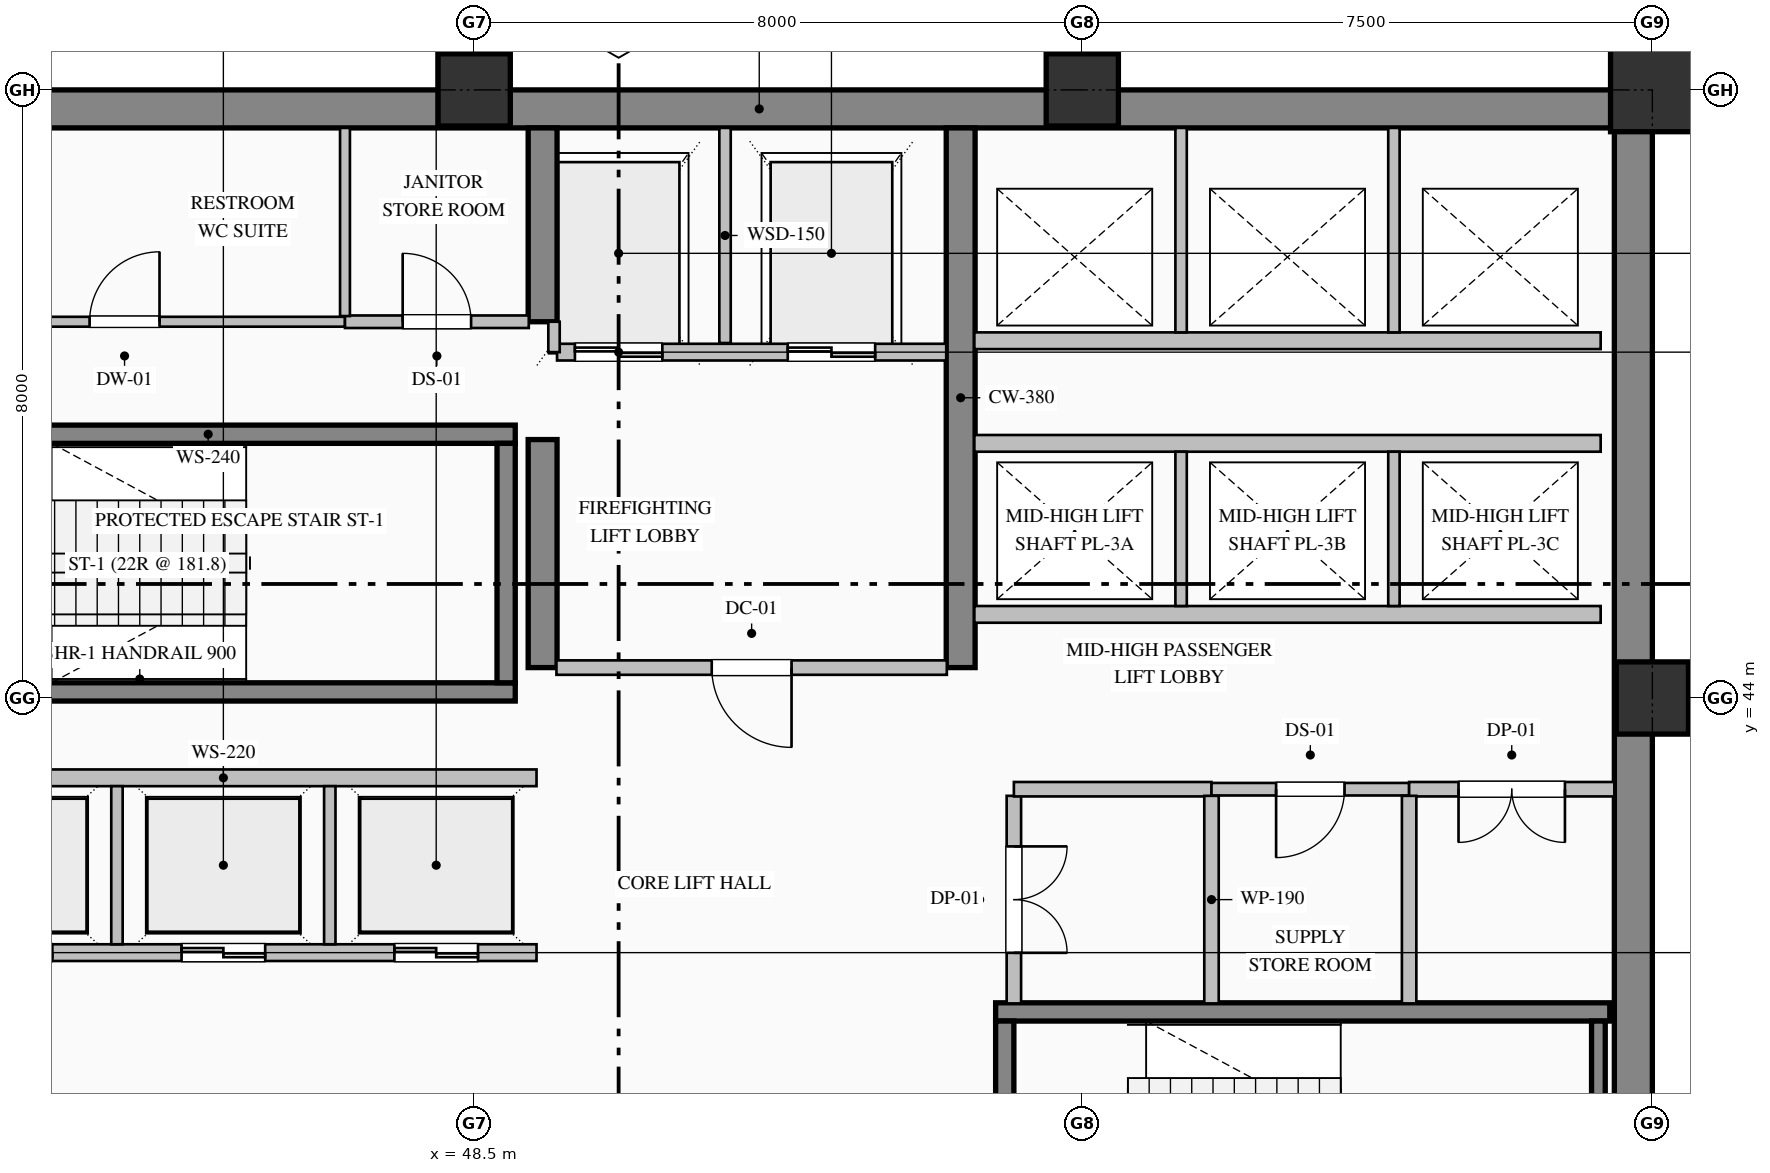
"""IFC4 building model, lengths in metres.
Left out: names, types, materials, properties, quantities, classifications, styles, units other than length and angle.
Written with IfcOpenShell. Run it as: python <this file> out.ifc"""

import sys

from ifc_helpers import new_model, si_unit, direction, frame, frame_2d, origin, origin_2d, place, context, subcontext, project, spatial, rectangle, hollow_rectangle, extrude, element, fill, save


model = new_model("IFC4")
c1 = context("Model", 3, precision=1e-05, world=origin(), true_north=direction((0.0, 1.0)))
c2 = subcontext(c1, "Body", "Model", "MODEL_VIEW")
j1 = project(units=[si_unit("LENGTHUNIT", "METRE"), si_unit("PLANEANGLEUNIT", "RADIAN")], contexts=[c1])
p1 = place(None, origin())
s1 = spatial("IfcSite", under=j1, at=p1, CompositionType="ELEMENT")
p2 = place(p1, origin())
s2 = spatial("IfcBuilding", under=s1, at=p2, CompositionType="ELEMENT")
p3 = place(p2, frame((0.0, 0.0, 127.0)))
s3 = spatial("IfcBuildingStorey", under=s2, at=p3, CompositionType="ELEMENT", Elevation=127.0)
p4 = place(p3, frame((40.5, 51.75, 0.0), z_axis=(0.0, 0.0, 1.0), x_axis=(1.0, 0.0, 0.0)))
e1 = element("IfcWall", 1, at=p4, inside=s3, PredefinedType="SHEAR", context=c2, shape_type="SweptSolid", body=[
    extrude(rectangle(XDim=23.5, YDim=0.5, at=frame_2d((11.75, 0.0))), origin(), (0.0, 0.0, 1.0), 3.765),
])
p5 = place(p3, frame((63.75, 36.32, 0.0), z_axis=(0.0, 0.0, 1.0), x_axis=(0.0, 1.0, 0.0)))
e2 = element("IfcWall", 2, at=p5, inside=s3, PredefinedType="SHEAR", context=c2, shape_type="SweptSolid", body=[
    extrude(rectangle(XDim=15.18, YDim=0.5, at=frame_2d((7.59, 0.0))), origin(), (0.0, 0.0, 1.0), 3.765),
])
p6 = place(p3, frame((49.4, 44.4, 0.0), z_axis=(0.0, 0.0, 1.0), x_axis=(0.0, 1.0, 0.0)))
e3 = element("IfcWall", 3, at=p6, inside=s3, PredefinedType="SHEAR", context=c2, shape_type="SweptSolid", body=[
    extrude(rectangle(XDim=3.0, YDim=0.38, at=frame_2d((1.5, 0.0))), origin(), (0.0, 0.0, 1.0), 3.765),
])
p7 = place(p3, frame((49.4, 48.95, 0.0), z_axis=(0.0, 0.0, 1.0), x_axis=(0.0, 1.0, 0.0)))
e4 = element("IfcWall", 4, at=p7, inside=s3, PredefinedType="SHEAR", context=c2, shape_type="SweptSolid", body=[
    extrude(rectangle(XDim=2.55, YDim=0.38, at=frame_2d((1.275, 0.0))), origin(), (0.0, 0.0, 1.0), 3.765),
])
p8 = place(p3, frame((54.9, 44.4, 0.0), z_axis=(0.0, 0.0, 1.0), x_axis=(0.0, 1.0, 0.0)))
e5 = element("IfcWall", 5, at=p8, inside=s3, PredefinedType="SHEAR", context=c2, shape_type="SweptSolid", body=[
    extrude(rectangle(XDim=7.1, YDim=0.38, at=frame_2d((3.55, 0.0))), origin(), (0.0, 0.0, 1.0), 3.765),
])
for number, where, z_axis, x_axis in (
    (6, (48.5, 52.0, 0.0), (0.0, 0.0, 1.0), (1.0, 0.0, 0.0)),
    (7, (56.5, 52.0, 0.0), (0.0, 0.0, 1.0), (1.0, 0.0, 0.0)),
    (8, (64.0, 44.0, 0.0), (0.0, 0.0, 1.0), (1.0, 0.0, 0.0)),
):
    element("IfcColumn", number, at=place(p3, frame(where, z_axis=z_axis, x_axis=x_axis)), inside=s3, PredefinedType="COLUMN", context=c2, shape_type="SweptSolid", body=[
        extrude(hollow_rectangle(XDim=0.95, YDim=0.95, WallThickness=0.036, at=origin_2d()), origin(), (0.0, 0.0, 1.0), 4.0),
    ])
p9 = place(p3, frame((64.0, 52.0, 0.0), z_axis=(0.0, 0.0, 1.0), x_axis=(1.0, 0.0, 0.0)))
e9 = element("IfcColumn", 9, at=p9, inside=s3, PredefinedType="COLUMN", context=c2, shape_type="SweptSolid", body=[
    extrude(hollow_rectangle(XDim=1.1, YDim=1.1, WallThickness=0.04, at=origin_2d()), origin(), (0.0, 0.0, 1.0), 4.0),
])
for number, where, z_axis, x_axis in (
    (10, (40.96, 47.47, 0.0), (0.0, 0.0, 1.0), (1.0, 0.0, 0.0)),
    (11, (49.04, 44.08, 0.0), (0.0, 0.0, 1.0), (-1.0, 0.0, 0.0)),
):
    element("IfcWall", number, at=place(p3, frame(where, z_axis=z_axis, x_axis=x_axis)), inside=s3, PredefinedType="SOLIDWALL", context=c2, shape_type="SweptSolid", body=[
        extrude(rectangle(XDim=8.08, YDim=0.24, at=frame_2d((4.04, 0.0))), origin(), (0.0, 0.0, 1.0), 4.0),
    ])
p10 = place(p3, frame((48.92, 44.2, 0.0), z_axis=(0.0, 0.0, 1.0), x_axis=(0.0, 1.0, 0.0)))
e12 = element("IfcWall", 12, at=p10, inside=s3, PredefinedType="SOLIDWALL", context=c2, shape_type="SweptSolid", body=[
    extrude(rectangle(XDim=3.15, YDim=0.24, at=frame_2d((1.575, 0.0))), origin(), (0.0, 0.0, 1.0), 4.0),
])
p11 = place(p3, frame((55.36, 39.87, 0.0), z_axis=(0.0, 0.0, 1.0), x_axis=(1.0, 0.0, 0.0)))
e13 = element("IfcWall", 13, at=p11, inside=s3, PredefinedType="SOLIDWALL", context=c2, shape_type="SweptSolid", body=[
    extrude(rectangle(XDim=8.08, YDim=0.24, at=frame_2d((4.04, 0.0))), origin(), (0.0, 0.0, 1.0), 4.0),
])
p12 = place(p3, frame((55.48, 39.75, 0.0), z_axis=(0.0, 0.0, 1.0), x_axis=(0.0, -1.0, 0.0)))
e14 = element("IfcWall", 14, at=p12, inside=s3, PredefinedType="SOLIDWALL", context=c2, shape_type="SweptSolid", body=[
    extrude(rectangle(XDim=3.15, YDim=0.24, at=frame_2d((1.575, 0.0))), origin(), (0.0, 0.0, 1.0), 4.0),
])
p13 = place(p12, frame((1.0, 0.0, 0.0)))
e15 = element("IfcOpeningElement", 15, at=p13, cuts=e14, PredefinedType="OPENING", context=c2, shape_type="SweptSolid", body=[
    extrude(rectangle(XDim=1.15, YDim=2.2, at=frame_2d((0.575, 1.1))), frame((0.0, 0.13, 0.0), z_axis=(0.0, -1.0, 0.0), x_axis=(1.0, 0.0, 0.0)), (0.0, 0.0, 1.0), 0.26),
])
p14 = place(p3, frame((63.29, 36.6, 0.0), z_axis=(0.0, 0.0, 1.0), x_axis=(0.0, 1.0, 0.0)))
e16 = element("IfcWall", 16, at=p14, inside=s3, PredefinedType="SOLIDWALL", context=c2, shape_type="SweptSolid", body=[
    extrude(rectangle(XDim=3.15, YDim=0.18, at=frame_2d((1.575, 0.0))), origin(), (0.0, 0.0, 1.0), 4.0),
])
p15 = place(p3, frame((54.71, 48.55, 0.0), z_axis=(0.0, 0.0, 1.0), x_axis=(-1.0, 0.0, 0.0)))
e17 = element("IfcWall", 17, at=p15, inside=s3, PredefinedType="PARTITIONING", context=c2, shape_type="SweptSolid", body=[
    extrude(rectangle(XDim=5.12, YDim=0.22, at=frame_2d((2.56, 0.0))), origin(), (0.0, 0.0, 1.0), 3.765),
])
p16 = place(p15, frame((3.735, 0.0, 0.0)))
e18 = element("IfcOpeningElement", 18, at=p16, cuts=e17, PredefinedType="OPENING", context=c2, shape_type="SweptSolid", body=[
    extrude(rectangle(XDim=1.15, YDim=2.2, at=frame_2d((0.575, 1.1))), frame((0.0, 0.12, 0.0), z_axis=(0.0, -1.0, 0.0), x_axis=(1.0, 0.0, 0.0)), (0.0, 0.0, 1.0), 0.24),
])
p17 = place(p15, frame((0.935, 0.0, 0.0)))
e19 = element("IfcOpeningElement", 19, at=p17, cuts=e17, PredefinedType="OPENING", context=c2, shape_type="SweptSolid", body=[
    extrude(rectangle(XDim=1.15, YDim=2.2, at=frame_2d((0.575, 1.1))), frame((0.0, 0.12, 0.0), z_axis=(0.0, -1.0, 0.0), x_axis=(1.0, 0.0, 0.0)), (0.0, 0.0, 1.0), 0.24),
])
p18 = place(p3, frame((51.8, 48.67, 0.0), z_axis=(0.0, 0.0, 1.0), x_axis=(0.0, 1.0, 0.0)))
e20 = element("IfcWall", 20, at=p18, inside=s3, PredefinedType="PARTITIONING", context=c2, shape_type="SweptSolid", body=[
    extrude(rectangle(XDim=2.83, YDim=0.15, at=frame_2d((1.415, 0.0))), origin(), (0.0, 0.0, 1.0), 3.765),
])
p19 = place(p3, frame((49.55, 48.55, 0.0), z_axis=(0.0, 0.0, 1.0), x_axis=(0.0, 1.0, 0.0)))
e21 = element("IfcWall", 21, at=p19, inside=s3, PredefinedType="PARTITIONING", context=c2, shape_type="SweptSolid", body=[
    extrude(rectangle(XDim=0.4, YDim=0.15, at=frame_2d((0.2, 0.0))), origin(), (0.0, 0.0, 1.0), 3.765),
])
p20 = place(p3, frame((49.32, 40.65, 0.0), z_axis=(0.0, 0.0, 1.0), x_axis=(-1.0, 0.0, 0.0)))
e22 = element("IfcWall", 22, at=p20, inside=s3, PredefinedType="PARTITIONING", context=c2, shape_type="SweptSolid", body=[
    extrude(rectangle(XDim=8.24, YDim=0.22, at=frame_2d((4.12, 0.0))), origin(), (0.0, 0.0, 1.0), 3.765),
])
p21 = place(p20, frame((6.37, 0.0, 0.0)))
e23 = element("IfcOpeningElement", 23, at=p21, cuts=e22, PredefinedType="OPENING", context=c2, shape_type="SweptSolid", body=[
    extrude(rectangle(XDim=1.1, YDim=2.2, at=frame_2d((0.55, 1.1))), frame((0.0, 0.12, 0.0), z_axis=(0.0, -1.0, 0.0), x_axis=(1.0, 0.0, 0.0)), (0.0, 0.0, 1.0), 0.24),
])
p22 = place(p20, frame((3.57, 0.0, 0.0)))
e24 = element("IfcOpeningElement", 24, at=p22, cuts=e22, PredefinedType="OPENING", context=c2, shape_type="SweptSolid", body=[
    extrude(rectangle(XDim=1.1, YDim=2.2, at=frame_2d((0.55, 1.1))), frame((0.0, 0.12, 0.0), z_axis=(0.0, -1.0, 0.0), x_axis=(1.0, 0.0, 0.0)), (0.0, 0.0, 1.0), 0.24),
])
p23 = place(p20, frame((0.77, 0.0, 0.0)))
e25 = element("IfcOpeningElement", 25, at=p23, cuts=e22, PredefinedType="OPENING", context=c2, shape_type="SweptSolid", body=[
    extrude(rectangle(XDim=1.1, YDim=2.2, at=frame_2d((0.55, 1.1))), frame((0.0, 0.12, 0.0), z_axis=(0.0, -1.0, 0.0), x_axis=(1.0, 0.0, 0.0)), (0.0, 0.0, 1.0), 0.24),
])
p24 = place(p3, frame((41.08, 42.95, 0.0), z_axis=(0.0, 0.0, 1.0), x_axis=(1.0, 0.0, 0.0)))
e26 = element("IfcWall", 26, at=p24, inside=s3, PredefinedType="PARTITIONING", context=c2, shape_type="SweptSolid", body=[
    extrude(rectangle(XDim=8.24, YDim=0.22, at=frame_2d((4.12, 0.0))), origin(), (0.0, 0.0, 1.0), 3.765),
])
for number, where, z_axis, x_axis in (
    (27, (43.8, 40.76, 0.0), (0.0, 0.0, 1.0), (0.0, 1.0, 0.0)),
    (28, (46.6, 40.76, 0.0), (0.0, 0.0, 1.0), (0.0, 1.0, 0.0)),
):
    element("IfcWall", number, at=place(p3, frame(where, z_axis=z_axis, x_axis=x_axis)), inside=s3, PredefinedType="PARTITIONING", context=c2, shape_type="SweptSolid", body=[
        extrude(rectangle(XDim=2.08, YDim=0.15, at=frame_2d((1.04, 0.0))), origin(), (0.0, 0.0, 1.0), 3.765),
    ])
for number, where, z_axis, x_axis in (
    (29, (63.32, 45.1, 0.0), (0.0, 0.0, 1.0), (-1.0, 0.0, 0.0)),
    (30, (55.08, 47.35, 0.0), (0.0, 0.0, 1.0), (1.0, 0.0, 0.0)),
):
    element("IfcWall", number, at=place(p3, frame(where, z_axis=z_axis, x_axis=x_axis)), inside=s3, PredefinedType="PARTITIONING", context=c2, shape_type="SweptSolid", body=[
        extrude(rectangle(XDim=8.24, YDim=0.22, at=frame_2d((4.12, 0.0))), origin(), (0.0, 0.0, 1.0), 3.765),
    ])
for number, where, z_axis, x_axis in (
    (31, (57.8, 45.21, 0.0), (0.0, 0.0, 1.0), (0.0, 1.0, 0.0)),
    (32, (60.6, 45.21, 0.0), (0.0, 0.0, 1.0), (0.0, 1.0, 0.0)),
):
    element("IfcWall", number, at=place(p3, frame(where, z_axis=z_axis, x_axis=x_axis)), inside=s3, PredefinedType="PARTITIONING", context=c2, shape_type="SweptSolid", body=[
        extrude(rectangle(XDim=2.03, YDim=0.15, at=frame_2d((1.015, 0.0))), origin(), (0.0, 0.0, 1.0), 3.765),
    ])
p25 = place(p3, frame((63.32, 48.7, 0.0), z_axis=(0.0, 0.0, 1.0), x_axis=(-1.0, 0.0, 0.0)))
e33 = element("IfcWall", 33, at=p25, inside=s3, PredefinedType="PARTITIONING", context=c2, shape_type="SweptSolid", body=[
    extrude(rectangle(XDim=8.24, YDim=0.22, at=frame_2d((4.12, 0.0))), origin(), (0.0, 0.0, 1.0), 3.765),
])
for number, where, z_axis, x_axis in (
    (34, (57.8, 48.81, 0.0), (0.0, 0.0, 1.0), (0.0, 1.0, 0.0)),
    (35, (60.6, 48.81, 0.0), (0.0, 0.0, 1.0), (0.0, 1.0, 0.0)),
):
    element("IfcWall", number, at=place(p3, frame(where, z_axis=z_axis, x_axis=x_axis)), inside=s3, PredefinedType="PARTITIONING", context=c2, shape_type="SweptSolid", body=[
        extrude(rectangle(XDim=2.69, YDim=0.15, at=frame_2d((1.345, 0.0))), origin(), (0.0, 0.0, 1.0), 3.765),
    ])
p26 = place(p3, frame((41.0, 48.95, 0.0), z_axis=(0.0, 0.0, 1.0), x_axis=(1.0, 0.0, 0.0)))
e36 = element("IfcWall", 36, at=p26, inside=s3, PredefinedType="PARTITIONING", context=c2, shape_type="SweptSolid", body=[
    extrude(rectangle(XDim=5.8, YDim=0.13, at=frame_2d((2.9, 0.0))), origin(), (0.0, 0.0, 1.0), 3.765),
])
p27 = place(p26, frame((2.44, 0.0, 0.0)))
e37 = element("IfcOpeningElement", 37, at=p27, cuts=e36, PredefinedType="OPENING", context=c2, shape_type="SweptSolid", body=[
    extrude(rectangle(XDim=0.92, YDim=2.15, at=frame_2d((0.46, 1.075))), frame((0.0, 0.075, 0.0), z_axis=(0.0, -1.0, 0.0), x_axis=(1.0, 0.0, 0.0)), (0.0, 0.0, 1.0), 0.15),
])
p28 = place(p3, frame((46.8, 48.95, 0.0), z_axis=(0.0, 0.0, 1.0), x_axis=(1.0, 0.0, 0.0)))
e38 = element("IfcWall", 38, at=p28, inside=s3, PredefinedType="PARTITIONING", context=c2, shape_type="SweptSolid", body=[
    extrude(rectangle(XDim=2.418, YDim=0.165, at=frame_2d((1.209, 0.0))), origin(), (0.0, 0.0, 1.0), 3.765),
])
p29 = place(p28, frame((0.759, 0.0, 0.0)))
e39 = element("IfcOpeningElement", 39, at=p29, cuts=e38, PredefinedType="OPENING", context=c2, shape_type="SweptSolid", body=[
    extrude(rectangle(XDim=0.9, YDim=2.15, at=frame_2d((0.45, 1.075))), frame((0.0, 0.093, 0.0), z_axis=(0.0, -1.0, 0.0), x_axis=(1.0, 0.0, 0.0)), (0.0, 0.0, 1.0), 0.185),
])
p30 = place(p3, frame((54.718, 44.4, 0.0), z_axis=(0.0, 0.0, 1.0), x_axis=(-1.0, 0.0, 0.0)))
e40 = element("IfcWall", 40, at=p30, inside=s3, PredefinedType="PARTITIONING", context=c2, shape_type="SweptSolid", body=[
    extrude(rectangle(XDim=5.136, YDim=0.19, at=frame_2d((2.568, 0.0))), origin(), (0.0, 0.0, 1.0), 3.765),
])
p31 = place(p30, frame((2.043, 0.0, 0.0)))
e41 = element("IfcOpeningElement", 41, at=p31, cuts=e40, PredefinedType="OPENING", context=c2, shape_type="SweptSolid", body=[
    extrude(rectangle(XDim=1.05, YDim=2.15, at=frame_2d((0.525, 1.075))), frame((0.0, 0.105, 0.0), z_axis=(0.0, -1.0, 0.0), x_axis=(1.0, 0.0, 0.0)), (0.0, 0.0, 1.0), 0.21),
])
p32 = place(p3, frame((55.6, 42.713, 0.0), z_axis=(0.0, 0.0, 1.0), x_axis=(0.0, -1.0, 0.0)))
e42 = element("IfcWall", 42, at=p32, inside=s3, PredefinedType="PARTITIONING", context=c2, shape_type="SweptSolid", body=[
    extrude(rectangle(XDim=2.731, YDim=0.19, at=frame_2d((1.365, 0.0))), origin(), (0.0, 0.0, 1.0), 3.765),
])
p33 = place(p32, frame((0.666, 0.0, 0.0)))
e43 = element("IfcOpeningElement", 43, at=p33, cuts=e42, PredefinedType="OPENING", context=c2, shape_type="SweptSolid", body=[
    extrude(rectangle(XDim=1.4, YDim=2.25, at=frame_2d((0.7, 1.125))), frame((0.0, 0.105, 0.0), z_axis=(0.0, -1.0, 0.0), x_axis=(1.0, 0.0, 0.0)), (0.0, 0.0, 1.0), 0.21),
])
p34 = place(p3, frame((58.2, 42.8, 0.0), z_axis=(0.0, 0.0, 1.0), x_axis=(-1.0, 0.0, 0.0)))
e44 = element("IfcWall", 44, at=p34, inside=s3, PredefinedType="PARTITIONING", context=c2, shape_type="SweptSolid", body=[
    extrude(rectangle(XDim=2.6, YDim=0.19, at=frame_2d((1.3, 0.0))), origin(), (0.0, 0.0, 1.0), 3.765),
])
p35 = place(p3, frame((60.8, 42.8, 0.0), z_axis=(0.0, 0.0, 1.0), x_axis=(-1.0, 0.0, 0.0)))
e45 = element("IfcWall", 45, at=p35, inside=s3, PredefinedType="PARTITIONING", context=c2, shape_type="SweptSolid", body=[
    extrude(rectangle(XDim=2.6, YDim=0.165, at=frame_2d((1.3, 0.0))), origin(), (0.0, 0.0, 1.0), 3.765),
])
p36 = place(p35, frame((0.85, 0.0, 0.0)))
e46 = element("IfcOpeningElement", 46, at=p36, cuts=e45, PredefinedType="OPENING", context=c2, shape_type="SweptSolid", body=[
    extrude(rectangle(XDim=0.9, YDim=2.15, at=frame_2d((0.45, 1.075))), frame((0.0, 0.093, 0.0), z_axis=(0.0, -1.0, 0.0), x_axis=(1.0, 0.0, 0.0)), (0.0, 0.0, 1.0), 0.185),
])
p37 = place(p3, frame((63.5, 42.8, 0.0), z_axis=(0.0, 0.0, 1.0), x_axis=(-1.0, 0.0, 0.0)))
e47 = element("IfcWall", 47, at=p37, inside=s3, PredefinedType="PARTITIONING", context=c2, shape_type="SweptSolid", body=[
    extrude(rectangle(XDim=2.7, YDim=0.19, at=frame_2d((1.35, 0.0))), origin(), (0.0, 0.0, 1.0), 3.765),
])
p38 = place(p37, frame((0.65, 0.0, 0.0)))
e48 = element("IfcOpeningElement", 48, at=p38, cuts=e47, PredefinedType="OPENING", context=c2, shape_type="SweptSolid", body=[
    extrude(rectangle(XDim=1.4, YDim=2.25, at=frame_2d((0.7, 1.125))), frame((0.0, 0.105, 0.0), z_axis=(0.0, -1.0, 0.0), x_axis=(1.0, 0.0, 0.0)), (0.0, 0.0, 1.0), 0.21),
])
p39 = place(p3, frame((46.8, 51.5, 0.0), z_axis=(0.0, 0.0, 1.0), x_axis=(0.0, -1.0, 0.0)))
e49 = element("IfcWall", 49, at=p39, inside=s3, PredefinedType="PARTITIONING", context=c2, shape_type="SweptSolid", body=[
    extrude(rectangle(XDim=2.476, YDim=0.13, at=frame_2d((1.238, 0.0))), origin(), (0.0, 0.0, 1.0), 3.765),
])
for number, where, z_axis, x_axis in (
    (50, (58.2, 42.713, 0.0), (0.0, 0.0, 1.0), (0.0, -1.0, 0.0)),
    (51, (60.8, 42.713, 0.0), (0.0, 0.0, 1.0), (0.0, -1.0, 0.0)),
):
    element("IfcWall", number, at=place(p3, frame(where, z_axis=z_axis, x_axis=x_axis)), inside=s3, PredefinedType="PARTITIONING", context=c2, shape_type="SweptSolid", body=[
        extrude(rectangle(XDim=2.731, YDim=0.19, at=frame_2d((1.365, 0.0))), origin(), (0.0, 0.0, 1.0), 3.765),
    ])
p40 = place(p16, origin())
e52 = element("IfcDoor", 52, at=p40, inside=s3, OperationType="DOUBLE_DOOR_SLIDING", PredefinedType="DOOR", context=c2, shape_type="SweptSolid", body=[
    extrude(rectangle(XDim=1.15, YDim=2.2, at=frame_2d((0.575, 1.1))), frame((0.0, 0.025, 0.0), z_axis=(0.0, -1.0, 0.0), x_axis=(1.0, 0.0, 0.0)), (0.0, 0.0, 1.0), 0.05),
])
fill(e18, e52)
p41 = place(p17, origin())
e53 = element("IfcDoor", 53, at=p41, inside=s3, OperationType="DOUBLE_DOOR_SLIDING", PredefinedType="DOOR", context=c2, shape_type="SweptSolid", body=[
    extrude(rectangle(XDim=1.15, YDim=2.2, at=frame_2d((0.575, 1.1))), frame((0.0, 0.025, 0.0), z_axis=(0.0, -1.0, 0.0), x_axis=(1.0, 0.0, 0.0)), (0.0, 0.0, 1.0), 0.05),
])
fill(e19, e53)
p42 = place(p22, origin())
e54 = element("IfcDoor", 54, at=p42, inside=s3, OperationType="DOUBLE_DOOR_SLIDING", PredefinedType="DOOR", context=c2, shape_type="SweptSolid", body=[
    extrude(rectangle(XDim=1.1, YDim=2.2, at=frame_2d((0.55, 1.1))), frame((0.0, 0.025, 0.0), z_axis=(0.0, -1.0, 0.0), x_axis=(1.0, 0.0, 0.0)), (0.0, 0.0, 1.0), 0.05),
])
fill(e24, e54)
p43 = place(p23, origin())
e55 = element("IfcDoor", 55, at=p43, inside=s3, OperationType="DOUBLE_DOOR_SLIDING", PredefinedType="DOOR", context=c2, shape_type="SweptSolid", body=[
    extrude(rectangle(XDim=1.1, YDim=2.2, at=frame_2d((0.55, 1.1))), frame((0.0, 0.025, 0.0), z_axis=(0.0, -1.0, 0.0), x_axis=(1.0, 0.0, 0.0)), (0.0, 0.0, 1.0), 0.05),
])
fill(e25, e55)
p44 = place(p31, origin())
e56 = element("IfcDoor", 56, at=p44, inside=s3, OperationType="SINGLE_SWING_LEFT", PredefinedType="DOOR", context=c2, shape_type="SweptSolid", body=[
    extrude(rectangle(XDim=1.05, YDim=2.15, at=frame_2d((0.525, 1.075))), frame((0.0, 0.025, 0.0), z_axis=(0.0, -1.0, 0.0), x_axis=(1.0, 0.0, 0.0)), (0.0, 0.0, 1.0), 0.05),
])
fill(e41, e56)
p45 = place(p27, origin())
e57 = element("IfcDoor", 57, at=p45, inside=s3, OperationType="SINGLE_SWING_RIGHT", PredefinedType="DOOR", context=c2, shape_type="SweptSolid", body=[
    extrude(rectangle(XDim=0.92, YDim=2.15, at=frame_2d((0.46, 1.075))), frame((0.0, 0.025, 0.0), z_axis=(0.0, -1.0, 0.0), x_axis=(1.0, 0.0, 0.0)), (0.0, 0.0, 1.0), 0.05),
])
fill(e37, e57)
p46 = place(p29, origin())
e58 = element("IfcDoor", 58, at=p46, inside=s3, OperationType="SINGLE_SWING_LEFT", PredefinedType="DOOR", context=c2, shape_type="SweptSolid", body=[
    extrude(rectangle(XDim=0.9, YDim=2.15, at=frame_2d((0.45, 1.075))), frame((0.0, 0.025, 0.0), z_axis=(0.0, -1.0, 0.0), x_axis=(1.0, 0.0, 0.0)), (0.0, 0.0, 1.0), 0.05),
])
fill(e39, e58)
p47 = place(p33, origin())
e59 = element("IfcDoor", 59, at=p47, inside=s3, OperationType="DOUBLE_DOOR_SINGLE_SWING", PredefinedType="DOOR", context=c2, shape_type="SweptSolid", body=[
    extrude(rectangle(XDim=1.4, YDim=2.25, at=frame_2d((0.7, 1.125))), frame((0.0, 0.025, 0.0), z_axis=(0.0, -1.0, 0.0), x_axis=(1.0, 0.0, 0.0)), (0.0, 0.0, 1.0), 0.05),
])
fill(e43, e59)
p48 = place(p36, origin())
e60 = element("IfcDoor", 60, at=p48, inside=s3, OperationType="SINGLE_SWING_RIGHT", PredefinedType="DOOR", context=c2, shape_type="SweptSolid", body=[
    extrude(rectangle(XDim=0.9, YDim=2.15, at=frame_2d((0.45, 1.075))), frame((0.0, 0.025, 0.0), z_axis=(0.0, -1.0, 0.0), x_axis=(1.0, 0.0, 0.0)), (0.0, 0.0, 1.0), 0.05),
])
fill(e46, e60)
p49 = place(p38, origin())
e61 = element("IfcDoor", 61, at=p49, inside=s3, OperationType="DOUBLE_DOOR_SINGLE_SWING", PredefinedType="DOOR", context=c2, shape_type="SweptSolid", body=[
    extrude(rectangle(XDim=1.4, YDim=2.25, at=frame_2d((0.7, 1.125))), frame((0.0, 0.025, 0.0), z_axis=(0.0, -1.0, 0.0), x_axis=(1.0, 0.0, 0.0)), (0.0, 0.0, 1.0), 0.05),
])
fill(e48, e61)
save(model, sys.argv[1])
